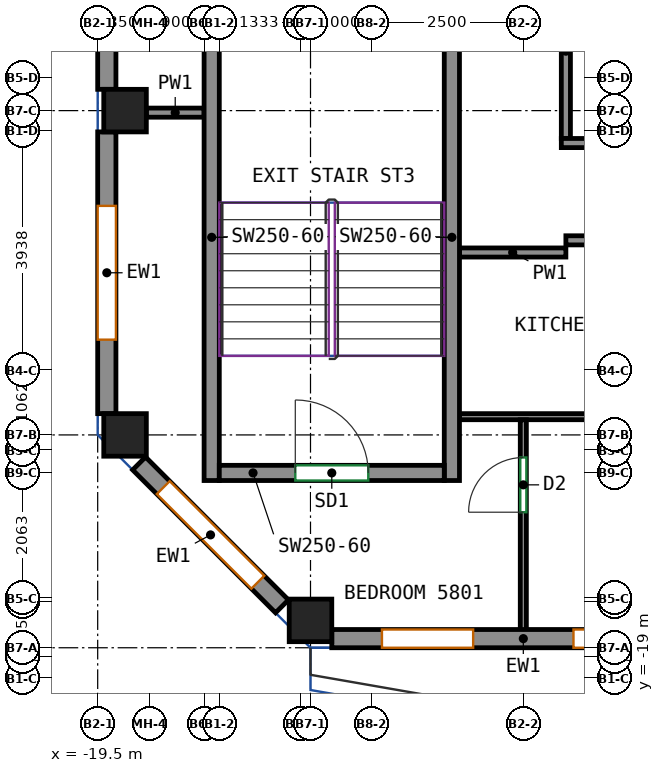
"""IFC4 building model, lengths in metres.
Left out: names, types, materials, properties, quantities, classifications, styles, units other than length and angle.
Written with IfcOpenShell. Run it as: python <this file> out.ifc"""

import sys

from ifc_helpers import new_model, si_unit, direction, frame, frame_2d, origin, origin_2d, place, context, subcontext, project, spatial, rectangle, extrude, source, transform, mapped, element, fill, save


model = new_model("IFC4")
c1 = context("Model", 3, precision=1e-05, world=origin(), true_north=direction((0.0, 1.0)))
c2 = subcontext(c1, "Body", "Model", "MODEL_VIEW")
j1 = project(units=[si_unit("LENGTHUNIT", "METRE"), si_unit("PLANEANGLEUNIT", "RADIAN")], contexts=[c1])
p1 = place(None, origin())
s1 = spatial("IfcSite", under=j1, at=p1, CompositionType="ELEMENT")
p2 = place(p1, origin())
s2 = spatial("IfcBuilding", under=s1, at=p2, CompositionType="ELEMENT")
p3 = place(p2, frame((0.0, 0.0, 242.4)))
s3 = spatial("IfcBuildingStorey", under=s2, at=p3, CompositionType="ELEMENT", Elevation=242.4)
m1 = source(origin(), c2, "Body", "SweptSolid", [
    extrude(rectangle(XDim=0.7, YDim=0.7, at=origin_2d()), origin(), (0.0, 0.0, 1.0), 3.12),
])
for number, where, z_axis, x_axis in (
    (1, (-19.05, -15.0, 0.0), (0.0, 0.0, 1.0), (1.0, 0.0, 0.0)),
    (2, (-19.05, -9.667, 0.0), (0.0, 0.0, 1.0), (1.0, 0.0, 0.0)),
    (3, (-16.0, -18.05, 0.0), (0.0, 0.0, 1.0), (1.0, 0.0, 0.0)),
):
    element("IfcColumn", number, at=place(p3, frame(where, z_axis=z_axis, x_axis=x_axis)), inside=s3, PredefinedType="COLUMN", context=c2, shape_type="MappedRepresentation", body=[
        mapped(m1, transform((0.0, 0.0, 0.0))),
    ])
m2 = source(origin(), c2, "Body", "SweptSolid", [
    extrude(rectangle(XDim=8.0, YDim=0.25, at=frame_2d((4.0, 0.0))), origin(), (0.0, 0.0, 1.0), 3.12),
])
for number, where, z_axis, x_axis in (
    (4, (-17.625, -15.75, 0.0), (0.0, 0.0, 1.0), (0.0, 1.0, 0.0)),
    (5, (-13.675, -15.75, 0.0), (0.0, 0.0, 1.0), (0.0, 1.0, 0.0)),
):
    element("IfcWall", number, at=place(p3, frame(where, z_axis=z_axis, x_axis=x_axis)), inside=s3, PredefinedType="SHEAR", context=c2, shape_type="MappedRepresentation", body=[
        mapped(m2, transform((0.0, 0.0, 0.0))),
    ])
m3 = source(origin(), c2, "Body", "SweptSolid", [
    extrude(rectangle(XDim=3.7, YDim=0.25, at=frame_2d((1.85, 0.0))), origin(), (0.0, 0.0, 1.0), 3.12),
])
p4 = place(p3, frame((-17.5, -15.625, 0.0), z_axis=(0.0, 0.0, 1.0), x_axis=(1.0, 0.0, 0.0)))
e6 = element("IfcWall", 6, at=p4, inside=s3, PredefinedType="SHEAR", context=c2, shape_type="MappedRepresentation", body=[
    mapped(m3, transform((0.0, 0.0, 0.0))),
])
p5 = place(p4, frame((1.25, 0.0, 0.0)))
e7 = element("IfcOpeningElement", 7, at=p5, cuts=e6, PredefinedType="OPENING", context=c2, shape_type="SweptSolid", body=[
    extrude(rectangle(XDim=1.2, YDim=2.1, at=frame_2d((0.6, 1.05))), frame((0.0, 0.135, 0.0), z_axis=(0.0, -1.0, 0.0), x_axis=(1.0, 0.0, 0.0)), (0.0, 0.0, 1.0), 0.27),
])
m4 = source(origin(), c2, "Body", "SweptSolid", [
    extrude(rectangle(XDim=6.3, YDim=0.3, at=frame_2d((3.15, 0.0))), origin(), (0.0, 0.0, 1.0), 3.12),
])
p6 = place(p3, frame((-15.65, -18.35, 0.0), z_axis=(0.0, 0.0, 1.0), x_axis=(1.0, 0.0, 0.0)))
e8 = element("IfcWall", 8, at=p6, inside=s3, PredefinedType="SOLIDWALL", context=c2, shape_type="MappedRepresentation", body=[
    mapped(m4, transform((0.0, 0.0, 0.0))),
])
p7 = place(p6, frame((0.825, 0.0, 0.8)))
e9 = element("IfcOpeningElement", 9, at=p7, cuts=e8, PredefinedType="OPENING", context=c2, shape_type="SweptSolid", body=[
    extrude(rectangle(XDim=1.5, YDim=2.05, at=frame_2d((0.75, 1.025))), frame((0.0, 0.16, 0.0), z_axis=(0.0, -1.0, 0.0), x_axis=(1.0, 0.0, 0.0)), (0.0, 0.0, 1.0), 0.32),
])
p8 = place(p6, frame((3.975, 0.0, 0.8)))
e10 = element("IfcOpeningElement", 10, at=p8, cuts=e8, PredefinedType="OPENING", context=c2, shape_type="SweptSolid", body=[
    extrude(rectangle(XDim=1.5, YDim=2.05, at=frame_2d((0.75, 1.025))), frame((0.0, 0.16, 0.0), z_axis=(0.0, -1.0, 0.0), x_axis=(1.0, 0.0, 0.0)), (0.0, 0.0, 1.0), 0.32),
])
m5 = source(origin(), c2, "Body", "SweptSolid", [
    extrude(rectangle(XDim=8.133, YDim=0.3, at=frame_2d((4.067, 0.0))), origin(), (0.0, 0.0, 1.0), 3.12),
])
p9 = place(p3, frame((-19.35, -1.183, 0.0), z_axis=(0.0, 0.0, 1.0), x_axis=(0.0, -1.0, 0.0)))
e11 = element("IfcWall", 11, at=p9, inside=s3, PredefinedType="SOLIDWALL", context=c2, shape_type="MappedRepresentation", body=[
    mapped(m5, transform((0.0, 0.0, 0.0))),
])
p10 = place(p9, frame((0.933, 0.0, 0.8)))
e12 = element("IfcOpeningElement", 12, at=p10, cuts=e11, PredefinedType="OPENING", context=c2, shape_type="SweptSolid", body=[
    extrude(rectangle(XDim=2.2, YDim=2.05, at=frame_2d((1.1, 1.025))), frame((0.0, 0.16, 0.0), z_axis=(0.0, -1.0, 0.0), x_axis=(1.0, 0.0, 0.0)), (0.0, 0.0, 1.0), 0.32),
])
p11 = place(p9, frame((5.0, 0.0, 0.8)))
e13 = element("IfcOpeningElement", 13, at=p11, cuts=e11, PredefinedType="OPENING", context=c2, shape_type="SweptSolid", body=[
    extrude(rectangle(XDim=2.2, YDim=2.05, at=frame_2d((1.1, 1.025))), frame((0.0, 0.16, 0.0), z_axis=(0.0, -1.0, 0.0), x_axis=(1.0, 0.0, 0.0)), (0.0, 0.0, 1.0), 0.32),
])
m6 = source(origin(), c2, "Body", "SweptSolid", [
    extrude(rectangle(XDim=4.633, YDim=0.3, at=frame_2d((2.317, 0.0))), origin(), (0.0, 0.0, 1.0), 3.12),
])
p12 = place(p3, frame((-19.35, -10.017, 0.0), z_axis=(0.0, 0.0, 1.0), x_axis=(0.0, -1.0, 0.0)))
e14 = element("IfcWall", 14, at=p12, inside=s3, PredefinedType="SOLIDWALL", context=c2, shape_type="MappedRepresentation", body=[
    mapped(m6, transform((0.0, 0.0, 0.0))),
])
p13 = place(p12, frame((1.217, 0.0, 0.8)))
e15 = element("IfcOpeningElement", 15, at=p13, cuts=e14, PredefinedType="OPENING", context=c2, shape_type="SweptSolid", body=[
    extrude(rectangle(XDim=2.2, YDim=2.05, at=frame_2d((1.1, 1.025))), frame((0.0, 0.16, 0.0), z_axis=(0.0, -1.0, 0.0), x_axis=(1.0, 0.0, 0.0)), (0.0, 0.0, 1.0), 0.32),
])
m7 = source(origin(), c2, "Body", "SweptSolid", [
    extrude(rectangle(XDim=3.323, YDim=0.3, at=frame_2d((1.662, 0.0))), origin(), (0.0, 0.0, 1.0), 3.12),
])
p14 = place(p3, frame((-18.819, -15.469, 0.0), z_axis=(0.0, 0.0, 1.0), x_axis=(0.707070049321, -0.707143511144, 0.0)))
e16 = element("IfcWall", 16, at=p14, inside=s3, PredefinedType="SOLIDWALL", context=c2, shape_type="MappedRepresentation", body=[
    mapped(m7, transform((0.0, 0.0, 0.0))),
])
p15 = place(p14, frame((0.562, 0.0, 0.8)))
e17 = element("IfcOpeningElement", 17, at=p15, cuts=e16, PredefinedType="OPENING", context=c2, shape_type="SweptSolid", body=[
    extrude(rectangle(XDim=2.2, YDim=2.05, at=frame_2d((1.1, 1.025))), frame((0.0, 0.16, 0.0), z_axis=(0.0, -1.0, 0.0), x_axis=(1.0, 0.0, 0.0)), (0.0, 0.0, 1.0), 0.32),
])
p16 = place(p3, frame((-11.8, -11.8, 0.0), z_axis=(0.0, 0.0, 1.0), x_axis=(1.0, 0.0, 0.0)))
e18 = element("IfcWall", 18, at=p16, inside=s3, PredefinedType="PARTITIONING", context=c2, shape_type="SweptSolid", body=[
    extrude(rectangle(XDim=29.55, YDim=0.15, at=frame_2d((14.775, 0.0))), origin(), (0.0, 0.0, 1.0), 3.12),
])
p17 = place(p16, frame((4.802, 0.0, 0.0)))
e19 = element("IfcOpeningElement", 19, at=p17, cuts=e18, PredefinedType="OPENING", context=c2, shape_type="SweptSolid", body=[
    extrude(rectangle(XDim=1.0, YDim=2.1, at=frame_2d((0.5, 1.05))), frame((0.0, 0.085, 0.0), z_axis=(0.0, -1.0, 0.0), x_axis=(1.0, 0.0, 0.0)), (0.0, 0.0, 1.0), 0.17),
])
p18 = place(p16, frame((23.314, 0.0, 0.0)))
e20 = element("IfcOpeningElement", 20, at=p18, cuts=e18, PredefinedType="OPENING", context=c2, shape_type="SweptSolid", body=[
    extrude(rectangle(XDim=1.0, YDim=2.1, at=frame_2d((0.5, 1.05))), frame((0.0, 0.085, 0.0), z_axis=(0.0, -1.0, 0.0), x_axis=(1.0, 0.0, 0.0)), (0.0, 0.0, 1.0), 0.17),
])
p19 = place(p3, frame((-13.55, -12.0, 0.0), z_axis=(0.0, 0.0, 1.0), x_axis=(1.0, 0.0, 0.0)))
e21 = element("IfcWall", 21, at=p19, inside=s3, PredefinedType="PARTITIONING", context=c2, shape_type="SweptSolid", body=[
    extrude(rectangle(XDim=1.75, YDim=0.15, at=frame_2d((0.875, 0.0))), origin(), (0.0, 0.0, 1.0), 3.12),
])
p20 = place(p3, frame((-18.7, -9.7, 0.0), z_axis=(0.0, 0.0, 1.0), x_axis=(1.0, 0.0, 0.0)))
e22 = element("IfcWall", 22, at=p20, inside=s3, PredefinedType="PARTITIONING", context=c2, shape_type="SweptSolid", body=[
    extrude(rectangle(XDim=0.95, YDim=0.15, at=frame_2d((0.475, 0.0))), origin(), (0.0, 0.0, 1.0), 3.12),
])
p21 = place(p3, frame((-11.8, -10.125, 0.0), z_axis=(0.0, 0.0, 1.0), x_axis=(0.0, 1.0, 0.0)))
e23 = element("IfcWall", 23, at=p21, inside=s3, PredefinedType="PARTITIONING", context=c2, shape_type="SweptSolid", body=[
    extrude(rectangle(XDim=4.785, YDim=0.15, at=frame_2d((2.393, 0.0))), origin(), (0.0, 0.0, 1.0), 3.12),
])
p22 = place(p21, frame((2.558, 0.0, 0.0)))
e24 = element("IfcOpeningElement", 24, at=p22, cuts=e23, PredefinedType="OPENING", context=c2, shape_type="SweptSolid", body=[
    extrude(rectangle(XDim=0.9, YDim=2.1, at=frame_2d((0.45, 1.05))), frame((0.0, 0.085, 0.0), z_axis=(0.0, -1.0, 0.0), x_axis=(1.0, 0.0, 0.0)), (0.0, 0.0, 1.0), 0.17),
])
p23 = place(p3, frame((-11.875, -10.2, 0.0), z_axis=(0.0, 0.0, 1.0), x_axis=(1.0, 0.0, 0.0)))
e25 = element("IfcWall", 25, at=p23, inside=s3, PredefinedType="PARTITIONING", context=c2, shape_type="SweptSolid", body=[
    extrude(rectangle(XDim=2.4, YDim=0.15, at=frame_2d((1.2, 0.0))), origin(), (0.0, 0.0, 1.0), 3.12),
])
p24 = place(p3, frame((-13.55, -14.7, 0.0), z_axis=(0.0, 0.0, 1.0), x_axis=(1.0, 0.0, 0.0)))
e26 = element("IfcWall", 26, at=p24, inside=s3, PredefinedType="PARTITIONING", context=c2, shape_type="SweptSolid", body=[
    extrude(rectangle(XDim=4.45, YDim=0.1, at=frame_2d((2.225, 0.0))), origin(), (0.0, 0.0, 1.0), 3.12),
])
p25 = place(p3, frame((-12.5, -18.25, 0.0), z_axis=(0.0, 0.0, 1.0), x_axis=(0.0, 1.0, 0.0)))
e27 = element("IfcWall", 27, at=p25, inside=s3, PredefinedType="PARTITIONING", context=c2, shape_type="SweptSolid", body=[
    extrude(rectangle(XDim=3.498, YDim=0.1, at=frame_2d((1.749, 0.0))), origin(), (0.0, 0.0, 1.0), 3.12),
])
p26 = place(p25, frame((1.979, 0.0, 0.0)))
e28 = element("IfcOpeningElement", 28, at=p26, cuts=e27, PredefinedType="OPENING", context=c2, shape_type="SweptSolid", body=[
    extrude(rectangle(XDim=0.9, YDim=2.1, at=frame_2d((0.45, 1.05))), frame((0.0, 0.06, 0.0), z_axis=(0.0, -1.0, 0.0), x_axis=(1.0, 0.0, 0.0)), (0.0, 0.0, 1.0), 0.12),
])
p27 = place(p7, origin())
e29 = element("IfcWindow", 29, at=p27, inside=s3, PartitioningType="SINGLE_PANEL", PredefinedType="WINDOW", context=c2, shape_type="SweptSolid", body=[
    extrude(rectangle(XDim=1.5, YDim=2.05, at=frame_2d((0.75, 1.025))), frame((0.0, 0.03, 0.0), z_axis=(0.0, -1.0, 0.0), x_axis=(1.0, 0.0, 0.0)), (0.0, 0.0, 1.0), 0.06),
])
fill(e9, e29)
p28 = place(p8, origin())
e30 = element("IfcWindow", 30, at=p28, inside=s3, PartitioningType="SINGLE_PANEL", PredefinedType="WINDOW", context=c2, shape_type="SweptSolid", body=[
    extrude(rectangle(XDim=1.5, YDim=2.05, at=frame_2d((0.75, 1.025))), frame((0.0, 0.03, 0.0), z_axis=(0.0, -1.0, 0.0), x_axis=(1.0, 0.0, 0.0)), (0.0, 0.0, 1.0), 0.06),
])
fill(e10, e30)
p29 = place(p13, origin())
e31 = element("IfcWindow", 31, at=p29, inside=s3, PartitioningType="SINGLE_PANEL", PredefinedType="WINDOW", context=c2, shape_type="SweptSolid", body=[
    extrude(rectangle(XDim=2.2, YDim=2.05, at=frame_2d((1.1, 1.025))), frame((0.0, 0.03, 0.0), z_axis=(0.0, -1.0, 0.0), x_axis=(1.0, 0.0, 0.0)), (0.0, 0.0, 1.0), 0.06),
])
fill(e15, e31)
p30 = place(p15, origin())
e32 = element("IfcWindow", 32, at=p30, inside=s3, PartitioningType="SINGLE_PANEL", PredefinedType="WINDOW", context=c2, shape_type="SweptSolid", body=[
    extrude(rectangle(XDim=2.2, YDim=2.05, at=frame_2d((1.1, 1.025))), frame((0.0, 0.03, 0.0), z_axis=(0.0, -1.0, 0.0), x_axis=(1.0, 0.0, 0.0)), (0.0, 0.0, 1.0), 0.06),
])
fill(e17, e32)
p31 = place(p5, origin())
e33 = element("IfcDoor", 33, at=p31, inside=s3, OperationType="DOUBLE_DOOR_SINGLE_SWING", PredefinedType="DOOR", context=c2, shape_type="SweptSolid", body=[
    extrude(rectangle(XDim=1.2, YDim=2.1, at=frame_2d((0.6, 1.05))), frame((0.0, 0.025, 0.0), z_axis=(0.0, -1.0, 0.0), x_axis=(1.0, 0.0, 0.0)), (0.0, 0.0, 1.0), 0.05),
])
fill(e7, e33)
p32 = place(p26, origin())
e34 = element("IfcDoor", 34, at=p32, inside=s3, OperationType="SINGLE_SWING_LEFT", PredefinedType="DOOR", context=c2, shape_type="SweptSolid", body=[
    extrude(rectangle(XDim=0.9, YDim=2.1, at=frame_2d((0.45, 1.05))), frame((0.0, 0.025, 0.0), z_axis=(0.0, -1.0, 0.0), x_axis=(1.0, 0.0, 0.0)), (0.0, 0.0, 1.0), 0.05),
])
fill(e28, e34)
save(model, sys.argv[1])
